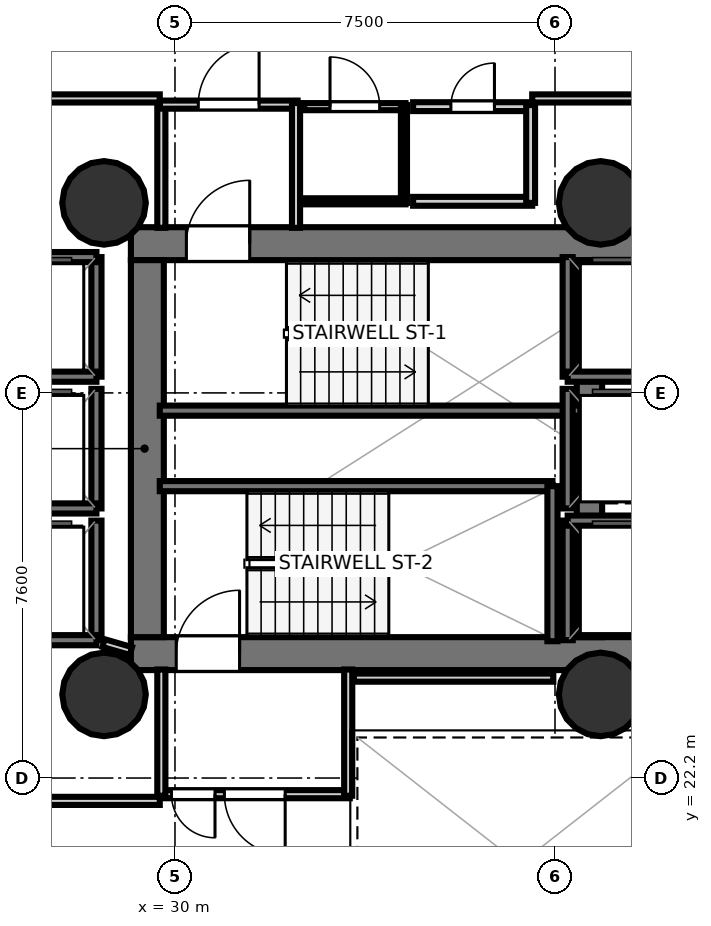
"""IFC4 building model, lengths in metres.
Left out: names, types, materials, properties, quantities, classifications, styles, units other than length and angle.
Written with IfcOpenShell. Run it as: python <this file> out.ifc"""

import sys

from ifc_helpers import new_model, si_unit, direction, frame, frame_2d, origin, origin_2d, place, context, subcontext, project, spatial, rectangle, hollow_circle, extrude, element, fill, save


model = new_model("IFC4")
c1 = context("Model", 3, precision=1e-05, world=origin(), true_north=direction((0.0, 1.0)))
c2 = subcontext(c1, "Body", "Model", "MODEL_VIEW")
j1 = project(units=[si_unit("LENGTHUNIT", "METRE"), si_unit("PLANEANGLEUNIT", "RADIAN")], contexts=[c1])
p1 = place(None, origin())
s1 = spatial("IfcSite", under=j1, at=p1, CompositionType="ELEMENT")
p2 = place(p1, origin())
s2 = spatial("IfcBuilding", under=s1, at=p2, CompositionType="ELEMENT")
p3 = place(p2, frame((0.0, 0.0, 74.7)))
s3 = spatial("IfcBuildingStorey", under=s2, at=p3, CompositionType="ELEMENT", Elevation=74.7)
p4 = place(p3, frame((29.13, 32.745, 0.0), z_axis=(0.0, 0.0, 1.0), x_axis=(1.0, 0.0, 0.0)))
e1 = element("IfcWall", 1, at=p4, inside=s3, PredefinedType="SHEAR", context=c2, shape_type="SweptSolid", body=[
    extrude(rectangle(XDim=10.72, YDim=0.65, at=frame_2d((5.36, 0.0))), origin(), (0.0, 0.0, 1.0), 3.52),
])
p5 = place(p4, frame((1.095, 0.0, 0.0)))
e2 = element("IfcOpeningElement", 2, at=p5, cuts=e1, PredefinedType="OPENING", context=c2, shape_type="SweptSolid", body=[
    extrude(rectangle(XDim=1.25, YDim=2.15, at=frame_2d((0.625, 1.075))), frame((0.0, 0.335, 0.0), z_axis=(0.0, -1.0, 0.0), x_axis=(1.0, 0.0, 0.0)), (0.0, 0.0, 1.0), 0.67),
])
p6 = place(p3, frame((29.13, 24.655, 0.0), z_axis=(0.0, 0.0, 1.0), x_axis=(1.0, 0.0, 0.0)))
e3 = element("IfcWall", 3, at=p6, inside=s3, PredefinedType="SHEAR", context=c2, shape_type="SweptSolid", body=[
    extrude(rectangle(XDim=10.72, YDim=0.65, at=frame_2d((5.36, 0.0))), origin(), (0.0, 0.0, 1.0), 3.52),
])
p7 = place(p6, frame((0.895, 0.0, 0.0)))
e4 = element("IfcOpeningElement", 4, at=p7, cuts=e3, PredefinedType="OPENING", context=c2, shape_type="SweptSolid", body=[
    extrude(rectangle(XDim=1.25, YDim=2.15, at=frame_2d((0.625, 1.075))), frame((0.0, 0.335, 0.0), z_axis=(0.0, -1.0, 0.0), x_axis=(1.0, 0.0, 0.0)), (0.0, 0.0, 1.0), 0.67),
])
p8 = place(p3, frame((29.455, 24.98, 0.0), z_axis=(0.0, 0.0, 1.0), x_axis=(0.0, 1.0, 0.0)))
e5 = element("IfcWall", 5, at=p8, inside=s3, PredefinedType="SHEAR", context=c2, shape_type="SweptSolid", body=[
    extrude(rectangle(XDim=7.44, YDim=0.65, at=frame_2d((3.72, 0.0))), origin(), (0.0, 0.0, 1.0), 3.52),
])
p9 = place(p3, frame((38.18, 24.98, 0.0), z_axis=(0.0, 0.0, 1.0), x_axis=(0.0, 1.0, 0.0)))
e6 = element("IfcWall", 6, at=p9, inside=s3, PredefinedType="SHEAR", context=c2, shape_type="SweptSolid", body=[
    extrude(rectangle(XDim=7.44, YDim=0.5, at=frame_2d((3.72, 0.0))), origin(), (0.0, 0.0, 1.0), 3.52),
])
for number, where, z_axis, x_axis in (
    (7, (28.6, 33.55, 0.0), (0.0, 0.0, 1.0), (1.0, 0.0, 0.0)),
    (8, (28.6, 23.85, 0.0), (0.0, 0.0, 1.0), (1.0, 0.0, 0.0)),
    (9, (38.4, 33.55, 0.0), (0.0, 0.0, 1.0), (1.0, 0.0, 0.0)),
    (10, (38.4, 23.85, 0.0), (0.0, 0.0, 1.0), (1.0, 0.0, 0.0)),
):
    element("IfcColumn", number, at=place(p3, frame(where, z_axis=z_axis, x_axis=x_axis)), inside=s3, PredefinedType="COLUMN", context=c2, shape_type="SweptSolid", body=[
        extrude(hollow_circle(Radius=0.825, WallThickness=0.04, at=origin_2d()), origin(), (0.0, 0.0, 1.0), 3.7),
    ])
p10 = place(p3, frame((29.7, 29.45, 0.0), z_axis=(0.0, 0.0, 1.0), x_axis=(1.0, 0.0, 0.0)))
e11 = element("IfcWall", 11, at=p10, inside=s3, PredefinedType="SOLIDWALL", context=c2, shape_type="SweptSolid", body=[
    extrude(rectangle(XDim=8.3, YDim=0.2, at=frame_2d((4.15, 0.0))), origin(), (0.0, 0.0, 1.0), 3.52),
])
p11 = place(p3, frame((29.7, 27.96, 0.0), z_axis=(0.0, 0.0, 1.0), x_axis=(1.0, 0.0, 0.0)))
e12 = element("IfcWall", 12, at=p11, inside=s3, PredefinedType="SOLIDWALL", context=c2, shape_type="SweptSolid", body=[
    extrude(rectangle(XDim=7.75, YDim=0.2, at=frame_2d((3.875, 0.0))), origin(), (0.0, 0.0, 1.0), 3.52),
])
p12 = place(p3, frame((37.45, 24.9, 0.0), z_axis=(0.0, 0.0, 1.0), x_axis=(0.0, 1.0, 0.0)))
e13 = element("IfcWall", 13, at=p12, inside=s3, PredefinedType="SOLIDWALL", context=c2, shape_type="SweptSolid", body=[
    extrude(rectangle(XDim=3.06, YDim=0.2, at=frame_2d((1.53, 0.0))), origin(), (0.0, 0.0, 1.0), 3.52),
])
p13 = place(p3, frame((37.75, 30.12, 0.0), z_axis=(0.0, 0.0, 1.0), x_axis=(0.0, 1.0, 0.0)))
e14 = element("IfcWall", 14, at=p13, inside=s3, PredefinedType="SOLIDWALL", context=c2, shape_type="SweptSolid", body=[
    extrude(rectangle(XDim=2.36, YDim=0.2, at=frame_2d((1.18, 0.0))), origin(), (0.0, 0.0, 1.0), 3.52),
])
p14 = place(p3, frame((37.75, 30.12, 0.0), z_axis=(0.0, 0.0, 1.0), x_axis=(1.0, 0.0, 0.0)))
e15 = element("IfcWall", 15, at=p14, inside=s3, PredefinedType="SOLIDWALL", context=c2, shape_type="SweptSolid", body=[
    extrude(rectangle(XDim=2.1, YDim=0.2, at=frame_2d((1.05, 0.0))), origin(), (0.0, 0.0, 1.0), 3.52),
])
p15 = place(p3, frame((37.75, 24.92, 0.0), z_axis=(0.0, 0.0, 1.0), x_axis=(0.0, 1.0, 0.0)))
e16 = element("IfcWall", 16, at=p15, inside=s3, PredefinedType="SOLIDWALL", context=c2, shape_type="SweptSolid", body=[
    extrude(rectangle(XDim=2.36, YDim=0.2, at=frame_2d((1.18, 0.0))), origin(), (0.0, 0.0, 1.0), 3.52),
])
p16 = place(p3, frame((37.75, 27.28, 0.0), z_axis=(0.0, 0.0, 1.0), x_axis=(1.0, 0.0, 0.0)))
e17 = element("IfcWall", 17, at=p16, inside=s3, PredefinedType="SOLIDWALL", context=c2, shape_type="SweptSolid", body=[
    extrude(rectangle(XDim=2.1, YDim=0.2, at=frame_2d((1.05, 0.0))), origin(), (0.0, 0.0, 1.0), 3.52),
])
p17 = place(p3, frame((28.45, 30.12, 0.0), z_axis=(0.0, 0.0, 1.0), x_axis=(0.0, 1.0, 0.0)))
e18 = element("IfcWall", 18, at=p17, inside=s3, PredefinedType="SOLIDWALL", context=c2, shape_type="SweptSolid", body=[
    extrude(rectangle(XDim=2.36, YDim=0.2, at=frame_2d((1.18, 0.0))), origin(), (0.0, 0.0, 1.0), 3.52),
])
for number, where, z_axis, x_axis in (
    (19, (26.35, 32.48, 0.0), (0.0, 0.0, 1.0), (1.0, 0.0, 0.0)),
    (20, (26.35, 30.12, 0.0), (0.0, 0.0, 1.0), (1.0, 0.0, 0.0)),
):
    element("IfcWall", number, at=place(p3, frame(where, z_axis=z_axis, x_axis=x_axis)), inside=s3, PredefinedType="SOLIDWALL", context=c2, shape_type="SweptSolid", body=[
        extrude(rectangle(XDim=2.1, YDim=0.2, at=frame_2d((1.05, 0.0))), origin(), (0.0, 0.0, 1.0), 3.52),
    ])
p18 = place(p3, frame((28.45, 27.52, 0.0), z_axis=(0.0, 0.0, 1.0), x_axis=(0.0, 1.0, 0.0)))
e21 = element("IfcWall", 21, at=p18, inside=s3, PredefinedType="SOLIDWALL", context=c2, shape_type="SweptSolid", body=[
    extrude(rectangle(XDim=2.36, YDim=0.2, at=frame_2d((1.18, 0.0))), origin(), (0.0, 0.0, 1.0), 3.52),
])
p19 = place(p3, frame((26.35, 27.52, 0.0), z_axis=(0.0, 0.0, 1.0), x_axis=(1.0, 0.0, 0.0)))
e22 = element("IfcWall", 22, at=p19, inside=s3, PredefinedType="SOLIDWALL", context=c2, shape_type="SweptSolid", body=[
    extrude(rectangle(XDim=2.1, YDim=0.2, at=frame_2d((1.05, 0.0))), origin(), (0.0, 0.0, 1.0), 3.52),
])
p20 = place(p3, frame((28.45, 24.92, 0.0), z_axis=(0.0, 0.0, 1.0), x_axis=(0.0, 1.0, 0.0)))
e23 = element("IfcWall", 23, at=p20, inside=s3, PredefinedType="SOLIDWALL", context=c2, shape_type="SweptSolid", body=[
    extrude(rectangle(XDim=2.36, YDim=0.2, at=frame_2d((1.18, 0.0))), origin(), (0.0, 0.0, 1.0), 3.52),
])
p21 = place(p3, frame((26.35, 24.92, 0.0), z_axis=(0.0, 0.0, 1.0), x_axis=(1.0, 0.0, 0.0)))
e24 = element("IfcWall", 24, at=p21, inside=s3, PredefinedType="SOLIDWALL", context=c2, shape_type="SweptSolid", body=[
    extrude(rectangle(XDim=2.1, YDim=0.2, at=frame_2d((1.05, 0.0))), origin(), (0.0, 0.0, 1.0), 3.52),
])
p22 = place(p3, frame((37.75, 27.52, 0.0), z_axis=(0.0, 0.0, 1.0), x_axis=(0.0, 1.0, 0.0)))
e25 = element("IfcWall", 25, at=p22, inside=s3, PredefinedType="SOLIDWALL", context=c2, shape_type="SweptSolid", body=[
    extrude(rectangle(XDim=2.36, YDim=0.2, at=frame_2d((1.18, 0.0))), origin(), (0.0, 0.0, 1.0), 3.52),
])
p23 = place(p3, frame((29.731, 33.058, 0.0), z_axis=(0.0, 0.0, 1.0), x_axis=(0.0, 1.0, 0.0)))
e26 = element("IfcWall", 26, at=p23, inside=s3, PredefinedType="PARTITIONING", context=c2, shape_type="SweptSolid", body=[
    extrude(rectangle(XDim=2.462, YDim=0.16, at=frame_2d((1.231, 0.0))), origin(), (0.0, 0.0, 1.0), 2.84),
])
p24 = place(p3, frame((29.7, 35.489, 0.0), z_axis=(0.0, 0.0, 1.0), x_axis=(1.0, 0.0, 0.0)))
e27 = element("IfcWall", 27, at=p24, inside=s3, PredefinedType="PARTITIONING", context=c2, shape_type="SweptSolid", body=[
    extrude(rectangle(XDim=2.72, YDim=0.16, at=frame_2d((1.36, 0.0))), origin(), (0.0, 0.0, 1.0), 2.84),
])
p25 = place(p24, frame((0.76, 0.0, 0.0)))
e28 = element("IfcOpeningElement", 28, at=p25, cuts=e27, PredefinedType="OPENING", context=c2, shape_type="SweptSolid", body=[
    extrude(rectangle(XDim=1.2, YDim=2.15, at=frame_2d((0.6, 1.075))), frame((0.0, 0.09, 0.0), z_axis=(0.0, -1.0, 0.0), x_axis=(1.0, 0.0, 0.0)), (0.0, 0.0, 1.0), 0.18),
])
p26 = place(p3, frame((32.389, 35.52, 0.0), z_axis=(0.0, 0.0, 1.0), x_axis=(0.0, -1.0, 0.0)))
e29 = element("IfcWall", 29, at=p26, inside=s3, PredefinedType="PARTITIONING", context=c2, shape_type="SweptSolid", body=[
    extrude(rectangle(XDim=2.462, YDim=0.16, at=frame_2d((1.231, 0.0))), origin(), (0.0, 0.0, 1.0), 2.84),
])
p27 = place(p3, frame((33.45, 21.881, 0.0), z_axis=(0.0, 0.0, 1.0), x_axis=(-1.0, 0.0, 0.0)))
e30 = element("IfcWall", 30, at=p27, inside=s3, PredefinedType="PARTITIONING", context=c2, shape_type="SweptSolid", body=[
    extrude(rectangle(XDim=3.75, YDim=0.16, at=frame_2d((1.875, 0.0))), origin(), (0.0, 0.0, 1.0), 2.84),
])
p28 = place(p27, frame((1.275, 0.0, 0.0)))
e31 = element("IfcOpeningElement", 31, at=p28, cuts=e30, PredefinedType="OPENING", context=c2, shape_type="SweptSolid", body=[
    extrude(rectangle(XDim=1.2, YDim=2.15, at=frame_2d((0.6, 1.075))), frame((0.0, 0.09, 0.0), z_axis=(0.0, -1.0, 0.0), x_axis=(1.0, 0.0, 0.0)), (0.0, 0.0, 1.0), 0.18),
])
p29 = place(p27, frame((2.66, 0.0, 0.0)))
e32 = element("IfcOpeningElement", 32, at=p29, cuts=e30, PredefinedType="OPENING", context=c2, shape_type="SweptSolid", body=[
    extrude(rectangle(XDim=0.86, YDim=2.05, at=frame_2d((0.43, 1.025))), frame((0.0, 0.09, 0.0), z_axis=(0.0, -1.0, 0.0), x_axis=(1.0, 0.0, 0.0)), (0.0, 0.0, 1.0), 0.18),
])
for number, where, z_axis, x_axis in (
    (33, (29.731, 21.85, 0.0), (0.0, 0.0, 1.0), (0.0, 1.0, 0.0)),
    (34, (33.419, 24.342, 0.0), (0.0, 0.0, 1.0), (0.0, -1.0, 0.0)),
):
    element("IfcWall", number, at=place(p3, frame(where, z_axis=z_axis, x_axis=x_axis)), inside=s3, PredefinedType="PARTITIONING", context=c2, shape_type="SweptSolid", body=[
        extrude(rectangle(XDim=2.492, YDim=0.16, at=frame_2d((1.246, 0.0))), origin(), (0.0, 0.0, 1.0), 2.84),
    ])
p30 = place(p3, frame((34.55, 33.581, 0.0), z_axis=(0.0, 0.0, 1.0), x_axis=(-1.0, 0.0, 0.0)))
e35 = element("IfcWall", 35, at=p30, inside=s3, PredefinedType="PARTITIONING", context=c2, shape_type="SweptSolid", body=[
    extrude(rectangle(XDim=2.0, YDim=0.12, at=frame_2d((1.0, 0.0))), origin(), (0.0, 0.0, 1.0), 2.84),
])
p31 = place(p3, frame((32.55, 35.449, 0.0), z_axis=(0.0, 0.0, 1.0), x_axis=(1.0, 0.0, 0.0)))
e36 = element("IfcWall", 36, at=p31, inside=s3, PredefinedType="PARTITIONING", context=c2, shape_type="SweptSolid", body=[
    extrude(rectangle(XDim=2.0, YDim=0.14, at=frame_2d((1.0, 0.0))), origin(), (0.0, 0.0, 1.0), 2.84),
])
p32 = place(p31, frame((0.51, 0.0, 0.0)))
e37 = element("IfcOpeningElement", 37, at=p32, cuts=e36, PredefinedType="OPENING", context=c2, shape_type="SweptSolid", body=[
    extrude(rectangle(XDim=0.98, YDim=2.1, at=frame_2d((0.49, 1.05))), frame((0.0, 0.08, 0.0), z_axis=(0.0, -1.0, 0.0), x_axis=(1.0, 0.0, 0.0)), (0.0, 0.0, 1.0), 0.16),
])
p33 = place(p3, frame((34.519, 35.48, 0.0), z_axis=(0.0, 0.0, 1.0), x_axis=(0.0, -1.0, 0.0)))
e38 = element("IfcWall", 38, at=p33, inside=s3, PredefinedType="PARTITIONING", context=c2, shape_type="SweptSolid", body=[
    extrude(rectangle(XDim=1.93, YDim=0.12, at=frame_2d((0.965, 0.0))), origin(), (0.0, 0.0, 1.0), 2.84),
])
p34 = place(p3, frame((37.05, 33.581, 0.0), z_axis=(0.0, 0.0, 1.0), x_axis=(-1.0, 0.0, 0.0)))
e39 = element("IfcWall", 39, at=p34, inside=s3, PredefinedType="PLUMBINGWALL", context=c2, shape_type="SweptSolid", body=[
    extrude(rectangle(XDim=2.35, YDim=0.175, at=frame_2d((1.175, 0.0))), origin(), (0.0, 0.0, 1.0), 2.84),
])
p35 = place(p3, frame((34.7, 35.449, 0.0), z_axis=(0.0, 0.0, 1.0), x_axis=(1.0, 0.0, 0.0)))
e40 = element("IfcWall", 40, at=p35, inside=s3, PredefinedType="PLUMBINGWALL", context=c2, shape_type="SweptSolid", body=[
    extrude(rectangle(XDim=2.35, YDim=0.175, at=frame_2d((1.175, 0.0))), origin(), (0.0, 0.0, 1.0), 2.84),
])
p36 = place(p35, frame((0.745, 0.0, 0.0)))
e41 = element("IfcOpeningElement", 41, at=p36, cuts=e40, PredefinedType="OPENING", context=c2, shape_type="SweptSolid", body=[
    extrude(rectangle(XDim=0.86, YDim=2.05, at=frame_2d((0.43, 1.025))), frame((0.0, 0.097, 0.0), z_axis=(0.0, -1.0, 0.0), x_axis=(1.0, 0.0, 0.0)), (0.0, 0.0, 1.0), 0.195),
])
p37 = place(p3, frame((37.019, 35.48, 0.0), z_axis=(0.0, 0.0, 1.0), x_axis=(0.0, -1.0, 0.0)))
e42 = element("IfcWall", 42, at=p37, inside=s3, PredefinedType="PLUMBINGWALL", context=c2, shape_type="SweptSolid", body=[
    extrude(rectangle(XDim=1.93, YDim=0.175, at=frame_2d((0.965, 0.0))), origin(), (0.0, 0.0, 1.0), 2.84),
])
p38 = place(p3, frame((29.13, 24.706, 0.0), z_axis=(0.0, 0.0, 1.0), x_axis=(-0.960451214223, 0.278448316742, 0.0)))
e43 = element("IfcWall", 43, at=p38, inside=s3, PredefinedType="PARTITIONING", context=c2, shape_type="SweptSolid", body=[
    extrude(rectangle(XDim=0.562, YDim=0.16, at=frame_2d((0.281, 0.0))), origin(), (0.0, 0.0, 1.0), 2.84),
])
p39 = place(p3, frame((37.467, 24.181, 0.0), z_axis=(0.0, 0.0, 1.0), x_axis=(-1.0, 0.0, 0.0)))
e44 = element("IfcWall", 44, at=p39, inside=s3, PredefinedType="PARTITIONING", context=c2, shape_type="SweptSolid", body=[
    extrude(rectangle(XDim=3.937, YDim=0.16, at=frame_2d((1.968, 0.0))), origin(), (0.0, 0.0, 1.0), 2.84),
])
p40 = place(p3, frame((39.818, 35.611, 0.0), z_axis=(0.0, 0.0, 1.0), x_axis=(-1.0, 0.0, 0.0)))
e45 = element("IfcWall", 45, at=p40, inside=s3, PredefinedType="PARTITIONING", context=c2, shape_type="SweptSolid", body=[
    extrude(rectangle(XDim=2.768, YDim=0.16, at=frame_2d((1.384, 0.0))), origin(), (0.0, 0.0, 1.0), 2.84),
])
p41 = place(p3, frame((29.7, 35.611, 0.0), z_axis=(0.0, 0.0, 1.0), x_axis=(-1.0, 0.0, 0.0)))
e46 = element("IfcWall", 46, at=p41, inside=s3, PredefinedType="PARTITIONING", context=c2, shape_type="SweptSolid", body=[
    extrude(rectangle(XDim=3.28, YDim=0.16, at=frame_2d((1.64, 0.0))), origin(), (0.0, 0.0, 1.0), 2.798),
])
p42 = place(p3, frame((26.42, 21.749, 0.0), z_axis=(0.0, 0.0, 1.0), x_axis=(1.0, 0.0, 0.0)))
e47 = element("IfcWall", 47, at=p42, inside=s3, PredefinedType="PARTITIONING", context=c2, shape_type="SweptSolid", body=[
    extrude(rectangle(XDim=3.28, YDim=0.16, at=frame_2d((1.64, 0.0))), origin(), (0.0, 0.0, 1.0), 2.84),
])
p43 = place(p5, origin())
e48 = element("IfcDoor", 48, at=p43, inside=s3, OperationType="SINGLE_SWING_RIGHT", PredefinedType="DOOR", context=c2, shape_type="SweptSolid", body=[
    extrude(rectangle(XDim=1.25, YDim=2.15, at=frame_2d((0.625, 1.075))), frame((0.0, 0.025, 0.0), z_axis=(0.0, -1.0, 0.0), x_axis=(1.0, 0.0, 0.0)), (0.0, 0.0, 1.0), 0.05),
])
fill(e2, e48)
p44 = place(p7, origin())
e49 = element("IfcDoor", 49, at=p44, inside=s3, OperationType="SINGLE_SWING_RIGHT", PredefinedType="DOOR", context=c2, shape_type="SweptSolid", body=[
    extrude(rectangle(XDim=1.25, YDim=2.15, at=frame_2d((0.625, 1.075))), frame((0.0, 0.025, 0.0), z_axis=(0.0, -1.0, 0.0), x_axis=(1.0, 0.0, 0.0)), (0.0, 0.0, 1.0), 0.05),
])
fill(e4, e49)
p45 = place(p25, origin())
e50 = element("IfcDoor", 50, at=p45, inside=s3, OperationType="SINGLE_SWING_RIGHT", PredefinedType="DOOR", context=c2, shape_type="SweptSolid", body=[
    extrude(rectangle(XDim=1.2, YDim=2.15, at=frame_2d((0.6, 1.075))), frame((0.0, 0.025, 0.0), z_axis=(0.0, -1.0, 0.0), x_axis=(1.0, 0.0, 0.0)), (0.0, 0.0, 1.0), 0.05),
])
fill(e28, e50)
p46 = place(p28, origin())
e51 = element("IfcDoor", 51, at=p46, inside=s3, OperationType="SINGLE_SWING_LEFT", PredefinedType="DOOR", context=c2, shape_type="SweptSolid", body=[
    extrude(rectangle(XDim=1.2, YDim=2.15, at=frame_2d((0.6, 1.075))), frame((0.0, 0.025, 0.0), z_axis=(0.0, -1.0, 0.0), x_axis=(1.0, 0.0, 0.0)), (0.0, 0.0, 1.0), 0.05),
])
fill(e31, e51)
p47 = place(p32, origin())
e52 = element("IfcDoor", 52, at=p47, inside=s3, OperationType="SINGLE_SWING_LEFT", PredefinedType="DOOR", context=c2, shape_type="SweptSolid", body=[
    extrude(rectangle(XDim=0.98, YDim=2.1, at=frame_2d((0.49, 1.05))), frame((0.0, 0.025, 0.0), z_axis=(0.0, -1.0, 0.0), x_axis=(1.0, 0.0, 0.0)), (0.0, 0.0, 1.0), 0.05),
])
fill(e37, e52)
p48 = place(p36, origin())
e53 = element("IfcDoor", 53, at=p48, inside=s3, OperationType="SINGLE_SWING_RIGHT", PredefinedType="DOOR", context=c2, shape_type="SweptSolid", body=[
    extrude(rectangle(XDim=0.86, YDim=2.05, at=frame_2d((0.43, 1.025))), frame((0.0, 0.025, 0.0), z_axis=(0.0, -1.0, 0.0), x_axis=(1.0, 0.0, 0.0)), (0.0, 0.0, 1.0), 0.05),
])
fill(e41, e53)
p49 = place(p29, origin())
e54 = element("IfcDoor", 54, at=p49, inside=s3, OperationType="SINGLE_SWING_LEFT", PredefinedType="DOOR", context=c2, shape_type="SweptSolid", body=[
    extrude(rectangle(XDim=0.86, YDim=2.05, at=frame_2d((0.43, 1.025))), frame((0.0, 0.025, 0.0), z_axis=(0.0, -1.0, 0.0), x_axis=(1.0, 0.0, 0.0)), (0.0, 0.0, 1.0), 0.05),
])
fill(e32, e54)
save(model, sys.argv[1])
